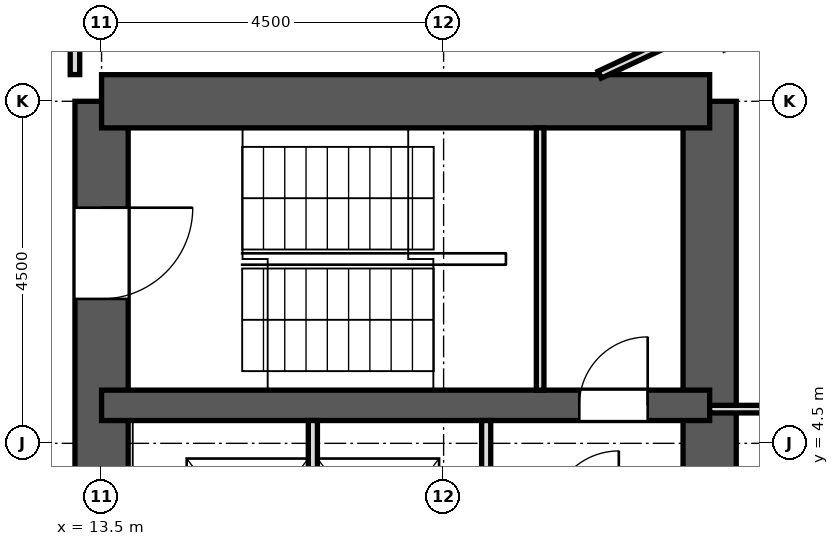
"""IFC4 building model, lengths in metres.
Left out: names, types, materials, properties, quantities, classifications, styles, units other than length and angle.
Written with IfcOpenShell. Run it as: python <this file> out.ifc"""

import sys

from ifc_helpers import new_model, si_unit, direction, frame, frame_2d, origin, place, context, subcontext, project, spatial, rectangle, extrude, element, fill, save


model = new_model("IFC4")
c1 = context("Model", 3, precision=1e-05, world=origin(), true_north=direction((0.0, 1.0)))
c2 = subcontext(c1, "Body", "Model", "MODEL_VIEW")
j1 = project(units=[si_unit("LENGTHUNIT", "METRE"), si_unit("PLANEANGLEUNIT", "RADIAN")], contexts=[c1])
p1 = place(None, origin())
s1 = spatial("IfcSite", under=j1, at=p1, CompositionType="ELEMENT")
p2 = place(p1, origin())
s2 = spatial("IfcBuilding", under=s1, at=p2, CompositionType="ELEMENT")
p3 = place(p2, frame((0.0, 0.0, 210.3)))
s3 = spatial("IfcBuildingStorey", under=s2, at=p3, CompositionType="ELEMENT", Elevation=210.3)
p4 = place(p3, frame((13.5, -9.0, 0.0), z_axis=(0.0, 0.0, 1.0), x_axis=(0.0, 1.0, 0.0)))
e1 = element("IfcWall", 1, at=p4, inside=s3, PredefinedType="SHEAR", context=c2, shape_type="SweptSolid", body=[
    extrude(rectangle(XDim=18.0, YDim=0.7, at=frame_2d((9.0, 0.0))), origin(), (0.0, 0.0, 1.0), 3.3),
])
p5 = place(p4, frame((15.4, 0.0, 0.0)))
e2 = element("IfcOpeningElement", 2, at=p5, cuts=e1, PredefinedType="OPENING", context=c2, shape_type="SweptSolid", body=[
    extrude(rectangle(XDim=1.2, YDim=2.1, at=frame_2d((0.6, 1.05))), frame((0.0, 0.362, 0.0), z_axis=(0.0, -1.0, 0.0), x_axis=(1.0, 0.0, 0.0)), (0.0, 0.0, 1.0), 0.724),
])
p6 = place(p4, frame((1.4, 0.0, 0.0)))
e3 = element("IfcOpeningElement", 3, at=p6, cuts=e1, PredefinedType="OPENING", context=c2, shape_type="SweptSolid", body=[
    extrude(rectangle(XDim=1.2, YDim=2.1, at=frame_2d((0.6, 1.05))), frame((0.0, 0.362, 0.0), z_axis=(0.0, -1.0, 0.0), x_axis=(1.0, 0.0, 0.0)), (0.0, 0.0, 1.0), 0.724),
])
p7 = place(p4, frame((7.5, 0.0, 0.0)))
e4 = element("IfcOpeningElement", 4, at=p7, cuts=e1, PredefinedType="OPENING", context=c2, shape_type="SweptSolid", body=[
    extrude(rectangle(XDim=3.0, YDim=2.4, at=frame_2d((1.5, 1.2))), frame((0.0, 0.362, 0.0), z_axis=(0.0, -1.0, 0.0), x_axis=(1.0, 0.0, 0.0)), (0.0, 0.0, 1.0), 0.724),
])
p8 = place(p3, frame((21.5, -9.0, 0.0), z_axis=(0.0, 0.0, 1.0), x_axis=(0.0, 1.0, 0.0)))
e5 = element("IfcWall", 5, at=p8, inside=s3, PredefinedType="SHEAR", context=c2, shape_type="SweptSolid", body=[
    extrude(rectangle(XDim=18.0, YDim=0.7, at=frame_2d((9.0, 0.0))), origin(), (0.0, 0.0, 1.0), 3.3),
])
p9 = place(p8, frame((9.45, 0.0, 0.0)))
e6 = element("IfcOpeningElement", 6, at=p9, cuts=e5, PredefinedType="OPENING", context=c2, shape_type="SweptSolid", body=[
    extrude(rectangle(XDim=0.9, YDim=2.1, at=frame_2d((0.45, 1.05))), frame((0.0, 0.362, 0.0), z_axis=(0.0, -1.0, 0.0), x_axis=(1.0, 0.0, 0.0)), (0.0, 0.0, 1.0), 0.724),
])
p10 = place(p8, frame((7.65, 0.0, 0.0)))
e7 = element("IfcOpeningElement", 7, at=p10, cuts=e5, PredefinedType="OPENING", context=c2, shape_type="SweptSolid", body=[
    extrude(rectangle(XDim=0.9, YDim=2.1, at=frame_2d((0.45, 1.05))), frame((0.0, 0.362, 0.0), z_axis=(0.0, -1.0, 0.0), x_axis=(1.0, 0.0, 0.0)), (0.0, 0.0, 1.0), 0.724),
])
p11 = place(p3, frame((13.5, 9.0, 0.0), z_axis=(0.0, 0.0, 1.0), x_axis=(1.0, 0.0, 0.0)))
e8 = element("IfcWall", 8, at=p11, inside=s3, PredefinedType="SHEAR", context=c2, shape_type="SweptSolid", body=[
    extrude(rectangle(XDim=8.0, YDim=0.7, at=frame_2d((4.0, 0.0))), origin(), (0.0, 0.0, 1.0), 3.3),
])
p12 = place(p3, frame((13.5, 5.0, 0.0), z_axis=(0.0, 0.0, 1.0), x_axis=(1.0, 0.0, 0.0)))
e9 = element("IfcWall", 9, at=p12, inside=s3, PredefinedType="SHEAR", context=c2, shape_type="SweptSolid", body=[
    extrude(rectangle(XDim=8.0, YDim=0.4, at=frame_2d((4.0, 0.0))), origin(), (0.0, 0.0, 1.0), 3.3),
])
p13 = place(p12, frame((6.285, 0.0, 0.0)))
e10 = element("IfcOpeningElement", 10, at=p13, cuts=e9, PredefinedType="OPENING", context=c2, shape_type="SweptSolid", body=[
    extrude(rectangle(XDim=0.9, YDim=2.1, at=frame_2d((0.45, 1.05))), frame((0.0, 0.212, 0.0), z_axis=(0.0, -1.0, 0.0), x_axis=(1.0, 0.0, 0.0)), (0.0, 0.0, 1.0), 0.424),
])
p14 = place(p3, frame((20.053, 9.35, 0.0), z_axis=(0.0, 0.0, 1.0), x_axis=(0.906055596822, 0.423158664648, 0.0)))
e11 = element("IfcWall", 11, at=p14, inside=s3, PredefinedType="PARTITIONING", context=c2, shape_type="SweptSolid", body=[
    extrude(rectangle(XDim=1.614, YDim=0.1, at=frame_2d((0.807, 0.0))), origin(), (0.0, 0.0, 1.0), 2.85),
])
p15 = place(p3, frame((13.15, 9.351, 0.0), z_axis=(0.0, 0.0, 1.0), x_axis=(0.0, 1.0, 0.0)))
e12 = element("IfcWall", 12, at=p15, inside=s3, PredefinedType="PARTITIONING", context=c2, shape_type="SweptSolid", body=[
    extrude(rectangle(XDim=2.216, YDim=0.125, at=frame_2d((1.108, 0.0))), origin(), (0.0, 0.0, 1.0), 2.85),
])
p16 = place(p3, frame((21.5, 4.95, 0.0), z_axis=(0.0, 0.0, 1.0), x_axis=(1.0, 0.0, 0.0)))
e13 = element("IfcWall", 13, at=p16, inside=s3, PredefinedType="PARTITIONING", context=c2, shape_type="SweptSolid", body=[
    extrude(rectangle(XDim=2.307, YDim=0.1, at=frame_2d((1.153, 0.0))), origin(), (0.0, 0.0, 1.0), 2.85),
])
for number, where, z_axis, x_axis in (
    (14, (16.28, 2.2, 0.0), (0.0, 0.0, 1.0), (0.0, 1.0, 0.0)),
    (15, (18.56, 2.2, 0.0), (0.0, 0.0, 1.0), (0.0, 1.0, 0.0)),
):
    element("IfcWall", number, at=place(p3, frame(where, z_axis=z_axis, x_axis=x_axis)), inside=s3, PredefinedType="PARTITIONING", context=c2, shape_type="SweptSolid", body=[
        extrude(rectangle(XDim=2.6, YDim=0.12, at=frame_2d((1.3, 0.0))), origin(), (0.0, 0.0, 1.0), 2.85),
    ])
p17 = place(p3, frame((19.27, 5.2, 0.0), z_axis=(0.0, 0.0, 1.0), x_axis=(0.0, 1.0, 0.0)))
e16 = element("IfcWall", 16, at=p17, inside=s3, PredefinedType="PARTITIONING", context=c2, shape_type="SweptSolid", body=[
    extrude(rectangle(XDim=3.45, YDim=0.1, at=frame_2d((1.725, 0.0))), origin(), (0.0, 0.0, 1.0), 2.85),
])
p18 = place(p13, origin())
e17 = element("IfcDoor", 17, at=p18, inside=s3, OperationType="SINGLE_SWING_RIGHT", PredefinedType="DOOR", context=c2, shape_type="SweptSolid", body=[
    extrude(rectangle(XDim=0.9, YDim=2.1, at=frame_2d((0.45, 1.05))), frame((0.0, 0.025, 0.0), z_axis=(0.0, -1.0, 0.0), x_axis=(1.0, 0.0, 0.0)), (0.0, 0.0, 1.0), 0.05),
])
fill(e10, e17)
p19 = place(p5, frame((1.2, 0.0, 0.0), z_axis=(0.0, 0.0, 1.0), x_axis=(-1.0, 0.0, 0.0)))
e18 = element("IfcDoor", 18, at=p19, inside=s3, OperationType="SINGLE_SWING_LEFT", PredefinedType="DOOR", context=c2, shape_type="SweptSolid", body=[
    extrude(rectangle(XDim=1.2, YDim=2.1, at=frame_2d((0.6, 1.05))), frame((0.0, 0.025, 0.0), z_axis=(0.0, -1.0, 0.0), x_axis=(1.0, 0.0, 0.0)), (0.0, 0.0, 1.0), 0.05),
])
fill(e2, e18)
save(model, sys.argv[1])
